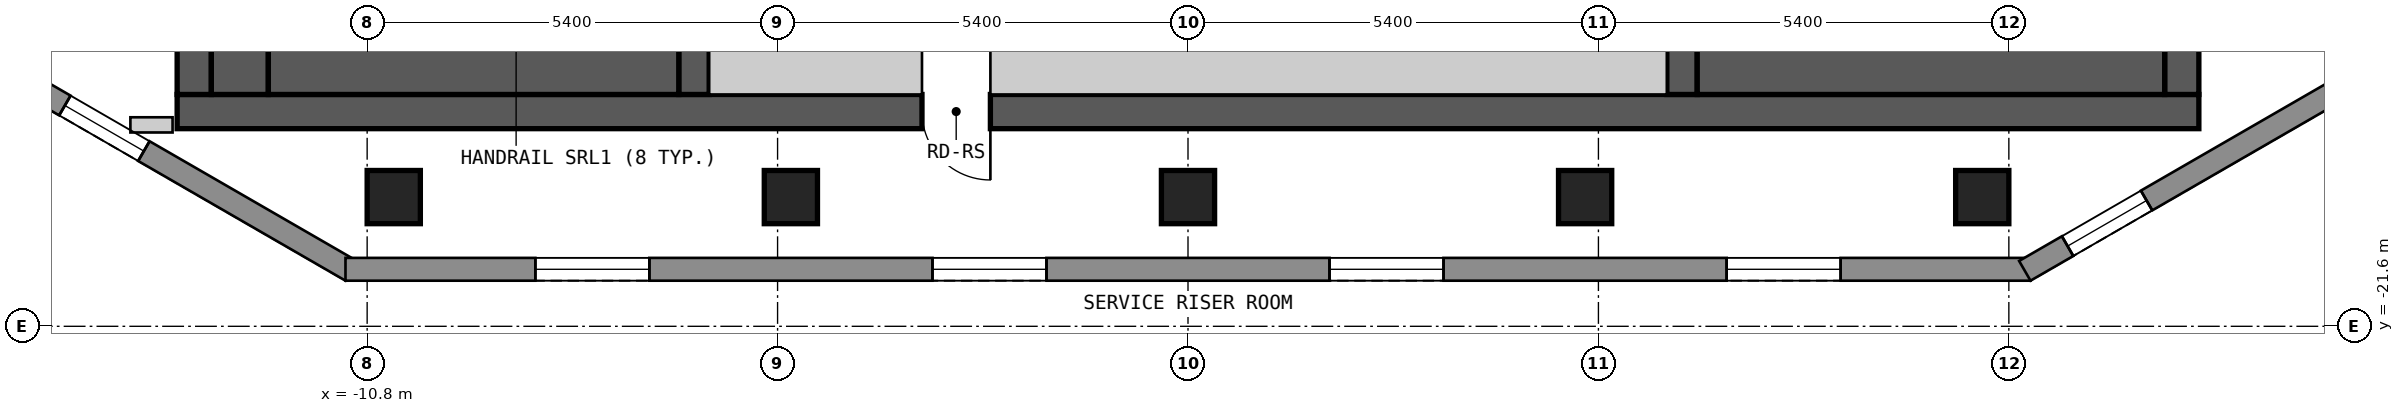
"""IFC4 building model, lengths in metres.
Left out: names, types, materials, properties, quantities, classifications, styles, units other than length and angle.
Written with IfcOpenShell. Run it as: python <this file> out.ifc"""

import sys

from ifc_helpers import new_model, si_unit, direction, frame, frame_2d, origin, origin_2d, place, context, subcontext, project, spatial, polyline, rectangle, outline, extrude, element, fill, save


model = new_model("IFC4")
c1 = context("Model", 3, precision=1e-05, world=origin(), true_north=direction((0.0, 1.0)))
c2 = subcontext(c1, "Body", "Model", "MODEL_VIEW")
j1 = project(units=[si_unit("LENGTHUNIT", "METRE"), si_unit("PLANEANGLEUNIT", "RADIAN")], contexts=[c1])
p1 = place(None, origin())
s1 = spatial("IfcSite", under=j1, at=p1, CompositionType="ELEMENT")
p2 = place(p1, origin())
s2 = spatial("IfcBuilding", under=s1, at=p2, CompositionType="ELEMENT")
p3 = place(p2, frame((0.0, 0.0, 205.8)))
s3 = spatial("IfcBuildingStorey", under=s2, at=p3, CompositionType="ELEMENT", Elevation=205.8)
for number, where, z_axis, x_axis in (
    (1, (-10.45, -19.9, 0.0), (0.0, 0.0, 1.0), (1.0, 0.0, 0.0)),
    (2, (-5.225, -19.9, 0.0), (0.0, 0.0, 1.0), (1.0, 0.0, 0.0)),
    (3, (0.0, -19.9, 0.0), (0.0, 0.0, 1.0), (1.0, 0.0, 0.0)),
    (4, (5.225, -19.9, 0.0), (0.0, 0.0, 1.0), (1.0, 0.0, 0.0)),
    (5, (10.45, -19.9, 0.0), (0.0, 0.0, 1.0), (1.0, 0.0, 0.0)),
):
    element("IfcColumn", number, at=place(p3, frame(where, z_axis=z_axis, x_axis=x_axis)), inside=s3, PredefinedType="COLUMN", context=c2, shape_type="SweptSolid", body=[
        extrude(rectangle(XDim=0.7, YDim=0.7, at=origin_2d()), origin(), (0.0, 0.0, 1.0), 3.0),
    ])
p4 = place(p3, frame((-13.3, -18.775, 0.0), z_axis=(0.0, 0.0, 1.0), x_axis=(1.0, 0.0, 0.0)))
e6 = element("IfcWall", 6, at=p4, inside=s3, PredefinedType="SHEAR", context=c2, shape_type="SweptSolid", body=[
    extrude(rectangle(XDim=26.6, YDim=0.45, at=frame_2d((13.3, 0.0))), origin(), (0.0, 0.0, 1.0), 2.7),
])
p5 = place(p4, frame((9.8, 0.0, 0.0)))
e7 = element("IfcOpeningElement", 7, at=p5, cuts=e6, PredefinedType="OPENING", context=c2, shape_type="SweptSolid", body=[
    extrude(rectangle(XDim=0.9, YDim=2.1, at=frame_2d((0.45, 1.05))), frame((0.0, 0.235, 0.0), z_axis=(0.0, -1.0, 0.0), x_axis=(1.0, 0.0, 0.0)), (0.0, 0.0, 1.0), 0.47),
])
p6 = place(p3, frame((-13.075, -18.55, 0.0), z_axis=(0.0, 0.0, 1.0), x_axis=(0.0, 1.0, 0.0)))
e8 = element("IfcWall", 8, at=p6, inside=s3, PredefinedType="SHEAR", context=c2, shape_type="SweptSolid", body=[
    extrude(rectangle(XDim=13.1, YDim=0.45, at=frame_2d((6.55, 0.0))), origin(), (0.0, 0.0, 1.0), 2.7),
])
p7 = place(p6, frame((4.35, 0.0, 0.0)))
e9 = element("IfcOpeningElement", 9, at=p7, cuts=e8, PredefinedType="OPENING", context=c2, shape_type="SweptSolid", body=[
    extrude(rectangle(XDim=1.2, YDim=2.1, at=frame_2d((0.6, 1.05))), frame((0.0, 0.235, 0.0), z_axis=(0.0, -1.0, 0.0), x_axis=(1.0, 0.0, 0.0)), (0.0, 0.0, 1.0), 0.47),
])
p8 = place(p3, frame((13.075, -18.55, 0.0), z_axis=(0.0, 0.0, 1.0), x_axis=(0.0, 1.0, 0.0)))
e10 = element("IfcWall", 10, at=p8, inside=s3, PredefinedType="SHEAR", context=c2, shape_type="SweptSolid", body=[
    extrude(rectangle(XDim=13.1, YDim=0.45, at=frame_2d((6.55, 0.0))), origin(), (0.0, 0.0, 1.0), 2.7),
])
for number, where, z_axis, x_axis in (
    (11, (-6.5, -18.55, 0.0), (0.0, 0.0, 1.0), (0.0, 1.0, 0.0)),
    (12, (6.5, -18.55, 0.0), (0.0, 0.0, 1.0), (0.0, 1.0, 0.0)),
):
    element("IfcWall", number, at=place(p3, frame(where, z_axis=z_axis, x_axis=x_axis)), inside=s3, PredefinedType="SHEAR", context=c2, shape_type="SweptSolid", body=[
        extrude(rectangle(XDim=3.7, YDim=0.4, at=frame_2d((1.85, 0.0))), origin(), (0.0, 0.0, 1.0), 2.7),
    ])
p9 = place(p3, frame((-15.34, -18.37, 0.0), z_axis=(0.0, 0.0, 1.0), x_axis=(0.866022959057, -0.500004234368, 0.0)))
e13 = element("IfcWall", 13, at=p9, inside=s3, PredefinedType="SOLIDWALL", context=c2, shape_type="SweptSolid", body=[
    extrude(outline(polyline([(0.0, -0.15), (5.0, -0.15), (4.92, 0.15), (0.08, 0.15), (0.0, -0.15)])), origin(), (0.0, 0.0, 1.0), 2.7),
])
p10 = place(p9, frame((0.65, 0.0, 0.15)))
e14 = element("IfcOpeningElement", 14, at=p10, cuts=e13, PredefinedType="OPENING", context=c2, shape_type="SweptSolid", body=[
    extrude(rectangle(XDim=1.2, YDim=2.1, at=frame_2d((0.6, 1.05))), frame((0.0, 0.16, 0.0), z_axis=(0.0, -1.0, 0.0), x_axis=(1.0, 0.0, 0.0)), (0.0, 0.0, 1.0), 0.32),
])
p11 = place(p3, frame((-11.085, -20.85, 0.0), z_axis=(0.0, 0.0, 1.0), x_axis=(1.0, 0.0, 0.0)))
e15 = element("IfcWall", 15, at=p11, inside=s3, PredefinedType="SOLIDWALL", context=c2, shape_type="SweptSolid", body=[
    extrude(outline(polyline([(0.0, -0.15), (22.17, -0.15), (22.09, 0.15), (0.08, 0.15), (0.0, -0.15)])), origin(), (0.0, 0.0, 1.0), 2.7),
])
p12 = place(p11, frame((2.498, 0.0, 0.15)))
e16 = element("IfcOpeningElement", 16, at=p12, cuts=e15, PredefinedType="OPENING", context=c2, shape_type="SweptSolid", body=[
    extrude(rectangle(XDim=1.5, YDim=2.1, at=frame_2d((0.75, 1.05))), frame((0.0, 0.16, 0.0), z_axis=(0.0, -1.0, 0.0), x_axis=(1.0, 0.0, 0.0)), (0.0, 0.0, 1.0), 0.32),
])
p13 = place(p11, frame((7.723, 0.0, 0.15)))
e17 = element("IfcOpeningElement", 17, at=p13, cuts=e15, PredefinedType="OPENING", context=c2, shape_type="SweptSolid", body=[
    extrude(rectangle(XDim=1.5, YDim=2.1, at=frame_2d((0.75, 1.05))), frame((0.0, 0.16, 0.0), z_axis=(0.0, -1.0, 0.0), x_axis=(1.0, 0.0, 0.0)), (0.0, 0.0, 1.0), 0.32),
])
p14 = place(p11, frame((12.947, 0.0, 0.15)))
e18 = element("IfcOpeningElement", 18, at=p14, cuts=e15, PredefinedType="OPENING", context=c2, shape_type="SweptSolid", body=[
    extrude(rectangle(XDim=1.5, YDim=2.1, at=frame_2d((0.75, 1.05))), frame((0.0, 0.16, 0.0), z_axis=(0.0, -1.0, 0.0), x_axis=(1.0, 0.0, 0.0)), (0.0, 0.0, 1.0), 0.32),
])
p15 = place(p11, frame((18.172, 0.0, 0.15)))
e19 = element("IfcOpeningElement", 19, at=p15, cuts=e15, PredefinedType="OPENING", context=c2, shape_type="SweptSolid", body=[
    extrude(rectangle(XDim=1.5, YDim=2.1, at=frame_2d((0.75, 1.05))), frame((0.0, 0.16, 0.0), z_axis=(0.0, -1.0, 0.0), x_axis=(1.0, 0.0, 0.0)), (0.0, 0.0, 1.0), 0.32),
])
p16 = place(p3, frame((11.01, -20.87, 0.0), z_axis=(0.0, 0.0, 1.0), x_axis=(0.866022959057, 0.500004234368, 0.0)))
e20 = element("IfcWall", 20, at=p16, inside=s3, PredefinedType="SOLIDWALL", context=c2, shape_type="SweptSolid", body=[
    extrude(outline(polyline([(0.0, -0.15), (5.0, -0.15), (4.92, 0.15), (0.08, 0.15), (0.0, -0.15)])), origin(), (0.0, 0.0, 1.0), 2.7),
])
p17 = place(p16, frame((0.65, 0.0, 0.15)))
e21 = element("IfcOpeningElement", 21, at=p17, cuts=e20, PredefinedType="OPENING", context=c2, shape_type="SweptSolid", body=[
    extrude(rectangle(XDim=1.2, YDim=2.1, at=frame_2d((0.6, 1.05))), frame((0.0, 0.16, 0.0), z_axis=(0.0, -1.0, 0.0), x_axis=(1.0, 0.0, 0.0)), (0.0, 0.0, 1.0), 0.32),
])
p18 = place(p3, frame((-13.915, -18.95, 0.0), z_axis=(0.0, 0.0, 1.0), x_axis=(1.0, 0.0, 0.0)))
e22 = element("IfcWall", 22, at=p18, inside=s3, PredefinedType="PARTITIONING", context=c2, shape_type="SweptSolid", body=[
    extrude(rectangle(XDim=0.555, YDim=0.2, at=frame_2d((0.277, 0.0))), origin(), (0.0, 0.0, 1.0), 2.7),
])
p19 = place(p3, frame((-12.475, -18.55, 0.0), z_axis=(0.0, 0.0, 1.0), x_axis=(0.0, 1.0, 0.0)))
e23 = element("IfcWall", 23, at=p19, inside=s3, PredefinedType="SOLIDWALL", context=c2, shape_type="SweptSolid", body=[
    extrude(rectangle(XDim=3.7, YDim=0.75, at=frame_2d((1.85, 0.0))), origin(), (0.0, 0.0, 1.0), 2.7),
])
p20 = place(p3, frame((-12.1, -18.175, 0.0), z_axis=(0.0, 0.0, 1.0), x_axis=(1.0, 0.0, 0.0)))
e24 = element("IfcWall", 24, at=p20, inside=s3, PredefinedType="SOLIDWALL", context=c2, shape_type="SweptSolid", body=[
    extrude(rectangle(XDim=5.4, YDim=0.75, at=frame_2d((2.7, 0.0))), origin(), (0.0, 0.0, 1.0), 2.7),
])
p21 = place(p3, frame((-6.3, -18.175, 0.0), z_axis=(0.0, 0.0, 1.0), x_axis=(1.0, 0.0, 0.0)))
e25 = element("IfcWall", 25, at=p21, inside=s3, PredefinedType="PARTITIONING", context=c2, shape_type="SweptSolid", body=[
    extrude(rectangle(XDim=2.8, YDim=0.75, at=frame_2d((1.4, 0.0))), origin(), (0.0, 0.0, 1.0), 2.7),
])
p22 = place(p3, frame((-2.6, -18.175, 0.0), z_axis=(0.0, 0.0, 1.0), x_axis=(1.0, 0.0, 0.0)))
e26 = element("IfcWall", 26, at=p22, inside=s3, PredefinedType="PARTITIONING", context=c2, shape_type="SweptSolid", body=[
    extrude(rectangle(XDim=8.9, YDim=0.75, at=frame_2d((4.45, 0.0))), origin(), (0.0, 0.0, 1.0), 2.7),
])
p23 = place(p3, frame((6.7, -18.075, 0.0), z_axis=(0.0, 0.0, 1.0), x_axis=(1.0, 0.0, 0.0)))
e27 = element("IfcWall", 27, at=p23, inside=s3, PredefinedType="SOLIDWALL", context=c2, shape_type="SweptSolid", body=[
    extrude(rectangle(XDim=6.15, YDim=0.95, at=frame_2d((3.075, 0.0))), origin(), (0.0, 0.0, 1.0), 2.7),
])
p24 = place(p10, origin())
e28 = element("IfcWindow", 28, at=p24, inside=s3, PartitioningType="SINGLE_PANEL", PredefinedType="WINDOW", context=c2, shape_type="SweptSolid", body=[
    extrude(rectangle(XDim=1.2, YDim=2.1, at=frame_2d((0.6, 1.05))), frame((0.0, 0.03, 0.0), z_axis=(0.0, -1.0, 0.0), x_axis=(1.0, 0.0, 0.0)), (0.0, 0.0, 1.0), 0.06),
])
fill(e14, e28)
p25 = place(p12, origin())
e29 = element("IfcWindow", 29, at=p25, inside=s3, PartitioningType="SINGLE_PANEL", PredefinedType="WINDOW", context=c2, shape_type="SweptSolid", body=[
    extrude(rectangle(XDim=1.5, YDim=2.1, at=frame_2d((0.75, 1.05))), frame((0.0, 0.03, 0.0), z_axis=(0.0, -1.0, 0.0), x_axis=(1.0, 0.0, 0.0)), (0.0, 0.0, 1.0), 0.06),
])
fill(e16, e29)
p26 = place(p13, origin())
e30 = element("IfcWindow", 30, at=p26, inside=s3, PartitioningType="SINGLE_PANEL", PredefinedType="WINDOW", context=c2, shape_type="SweptSolid", body=[
    extrude(rectangle(XDim=1.5, YDim=2.1, at=frame_2d((0.75, 1.05))), frame((0.0, 0.03, 0.0), z_axis=(0.0, -1.0, 0.0), x_axis=(1.0, 0.0, 0.0)), (0.0, 0.0, 1.0), 0.06),
])
fill(e17, e30)
p27 = place(p14, origin())
e31 = element("IfcWindow", 31, at=p27, inside=s3, PartitioningType="SINGLE_PANEL", PredefinedType="WINDOW", context=c2, shape_type="SweptSolid", body=[
    extrude(rectangle(XDim=1.5, YDim=2.1, at=frame_2d((0.75, 1.05))), frame((0.0, 0.03, 0.0), z_axis=(0.0, -1.0, 0.0), x_axis=(1.0, 0.0, 0.0)), (0.0, 0.0, 1.0), 0.06),
])
fill(e18, e31)
p28 = place(p15, origin())
e32 = element("IfcWindow", 32, at=p28, inside=s3, PartitioningType="SINGLE_PANEL", PredefinedType="WINDOW", context=c2, shape_type="SweptSolid", body=[
    extrude(rectangle(XDim=1.5, YDim=2.1, at=frame_2d((0.75, 1.05))), frame((0.0, 0.03, 0.0), z_axis=(0.0, -1.0, 0.0), x_axis=(1.0, 0.0, 0.0)), (0.0, 0.0, 1.0), 0.06),
])
fill(e19, e32)
p29 = place(p17, origin())
e33 = element("IfcWindow", 33, at=p29, inside=s3, PartitioningType="SINGLE_PANEL", PredefinedType="WINDOW", context=c2, shape_type="SweptSolid", body=[
    extrude(rectangle(XDim=1.2, YDim=2.1, at=frame_2d((0.6, 1.05))), frame((0.0, 0.03, 0.0), z_axis=(0.0, -1.0, 0.0), x_axis=(1.0, 0.0, 0.0)), (0.0, 0.0, 1.0), 0.06),
])
fill(e21, e33)
p30 = place(p5, origin())
e34 = element("IfcDoor", 34, at=p30, inside=s3, OperationType="SINGLE_SWING_RIGHT", PredefinedType="DOOR", context=c2, shape_type="SweptSolid", body=[
    extrude(rectangle(XDim=0.9, YDim=2.1, at=frame_2d((0.45, 1.05))), frame((0.0, 0.025, 0.0), z_axis=(0.0, -1.0, 0.0), x_axis=(1.0, 0.0, 0.0)), (0.0, 0.0, 1.0), 0.05),
])
fill(e7, e34)
save(model, sys.argv[1])
